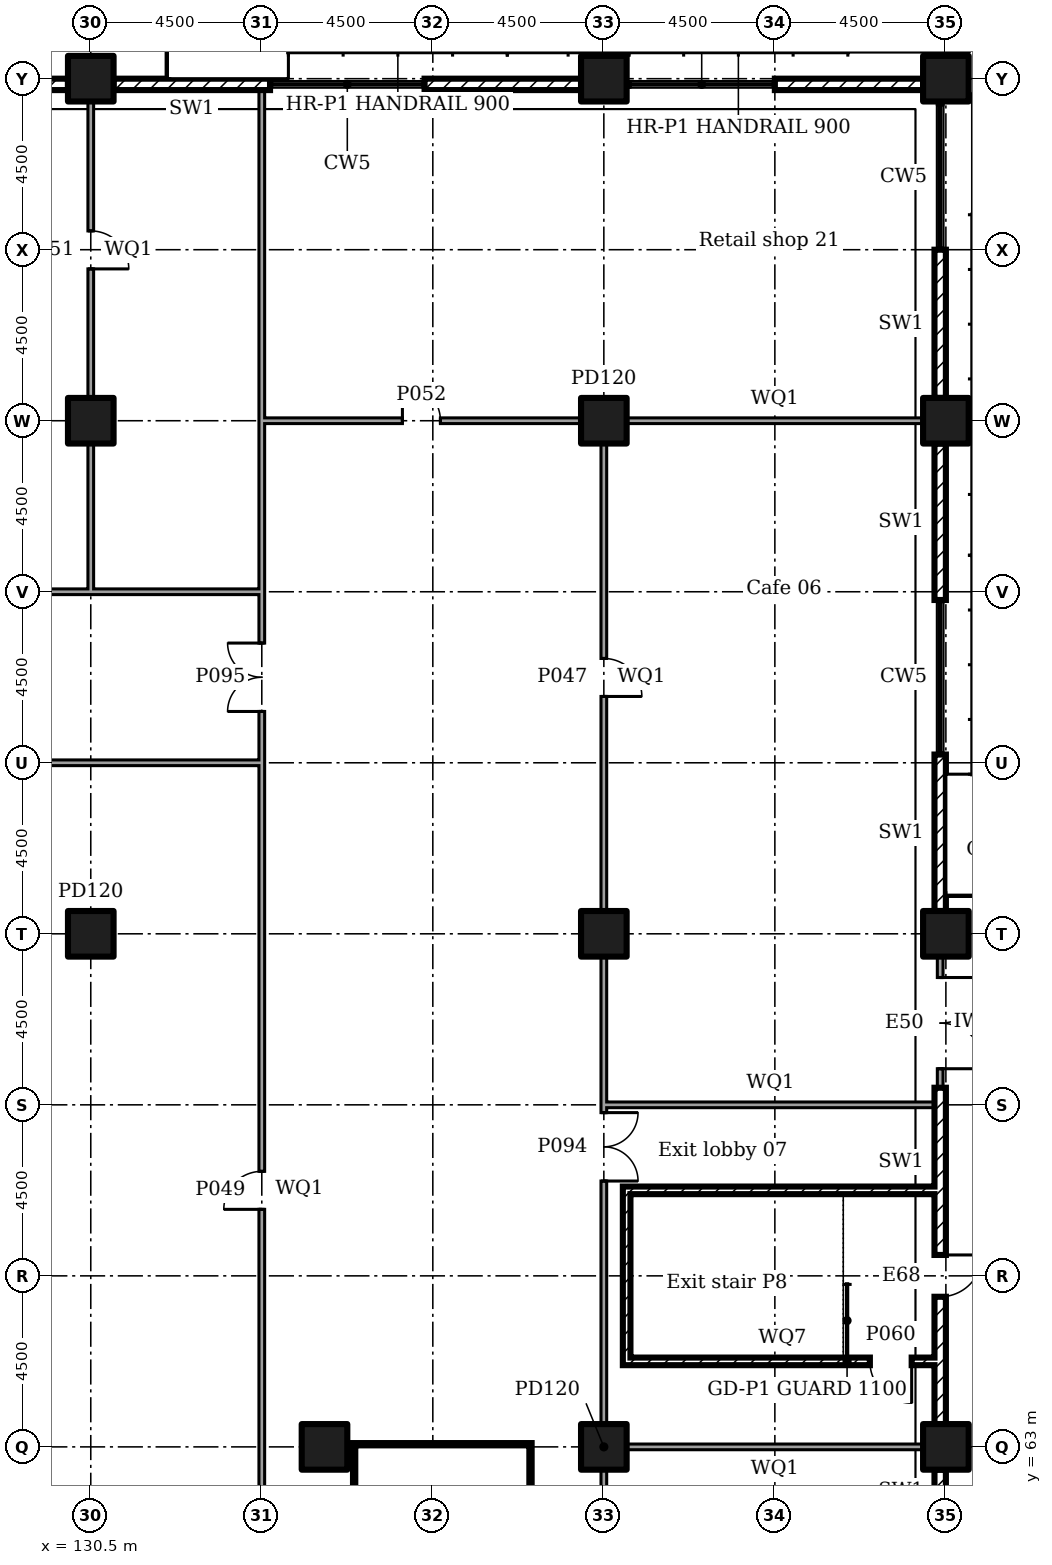
"""IFC4 building model, lengths in metres.
Left out: names, types, materials, properties, quantities, classifications, styles, units other than length and angle.
Written with IfcOpenShell. Run it as: python <this file> out.ifc"""

import sys

from ifc_helpers import new_model, si_unit, direction, frame, frame_2d, origin, origin_2d, place, context, subcontext, project, spatial, rectangle, extrude, element, fill, save


model = new_model("IFC4")
c1 = context("Model", 3, precision=1e-05, world=origin(), true_north=direction((0.0, 1.0)))
c2 = subcontext(c1, "Body", "Model", "MODEL_VIEW")
j1 = project(units=[si_unit("LENGTHUNIT", "METRE"), si_unit("PLANEANGLEUNIT", "RADIAN")], contexts=[c1])
p1 = place(None, origin())
s1 = spatial("IfcSite", under=j1, at=p1, CompositionType="ELEMENT")
p2 = place(p1, origin())
s2 = spatial("IfcBuilding", under=s1, at=p2, CompositionType="ELEMENT")
p3 = place(p2, origin())
s3 = spatial("IfcBuildingStorey", under=s2, at=p3, CompositionType="ELEMENT", Elevation=0.0)
for number, where in (
    (1, (130.5, 76.5, 0.0)),
    (2, (130.5, 90.0, 0.0)),
    (3, (130.5, 99.0, 0.0)),
    (4, (136.65, 63.0, 0.0)),
    (5, (144.0, 63.0, 0.0)),
    (6, (144.0, 76.5, 0.0)),
    (7, (144.0, 90.0, 0.0)),
    (8, (144.0, 99.0, 0.0)),
    (9, (153.0, 63.0, 0.0)),
    (10, (153.0, 76.5, 0.0)),
    (11, (153.0, 90.0, 0.0)),
    (12, (153.0, 99.0, 0.0)),
):
    element("IfcColumn", number, at=place(p3, frame(where)), inside=s3, PredefinedType="COLUMN", context=c2, shape_type="SweptSolid", body=[
        extrude(rectangle(XDim=1.2, YDim=1.2, at=origin_2d()), origin(), (0.0, 0.0, 1.0), 6.0),
    ])
p4 = place(p3, frame((152.85, 61.3, 0.0), z_axis=(0.0, 0.0, 1.0), x_axis=(0.0, 1.0, 0.0)))
e13 = element("IfcWall", 13, at=p4, inside=s3, PredefinedType="ELEMENTEDWALL", context=c2, shape_type="SweptSolid", body=[
    extrude(rectangle(XDim=1.1, YDim=0.3, at=frame_2d((0.55, 0.0))), origin(), (0.0, 0.0, 1.0), 5.55),
])
p5 = place(p3, frame((152.85, 63.6, 0.0), z_axis=(0.0, 0.0, 1.0), x_axis=(0.0, 1.0, 0.0)))
e14 = element("IfcWall", 14, at=p5, inside=s3, PredefinedType="ELEMENTEDWALL", context=c2, shape_type="SweptSolid", body=[
    extrude(rectangle(XDim=2.85, YDim=0.3, at=frame_2d((1.425, 0.0))), origin(), (0.0, 0.0, 1.0), 5.55),
])
p6 = place(p3, frame((152.85, 66.45, 0.0), z_axis=(0.0, 0.0, 1.0), x_axis=(0.0, 1.0, 0.0)))
e15 = element("IfcWall", 15, at=p6, inside=s3, PredefinedType="ELEMENTEDWALL", context=c2, shape_type="SweptSolid", body=[
    extrude(rectangle(XDim=2.1, YDim=0.3, at=frame_2d((1.05, 0.0))), origin(), (0.0, 0.0, 1.0), 5.55),
])
p7 = place(p6, frame((0.5, 0.0, 0.0)))
e16 = element("IfcOpeningElement", 16, at=p7, cuts=e15, PredefinedType="OPENING", context=c2, shape_type="SweptSolid", body=[
    extrude(rectangle(XDim=1.1, YDim=2.4, at=frame_2d((0.55, 1.2))), frame((0.0, 0.16, 0.0), z_axis=(0.0, -1.0, 0.0), x_axis=(1.0, 0.0, 0.0)), (0.0, 0.0, 1.0), 0.32),
])
p8 = place(p3, frame((152.85, 68.55, 0.0), z_axis=(0.0, 0.0, 1.0), x_axis=(0.0, 1.0, 0.0)))
e17 = element("IfcWall", 17, at=p8, inside=s3, PredefinedType="ELEMENTEDWALL", context=c2, shape_type="SweptSolid", body=[
    extrude(rectangle(XDim=3.9, YDim=0.3, at=frame_2d((1.95, 0.0))), origin(), (0.0, 0.0, 1.0), 5.55),
])
p9 = place(p3, frame((152.85, 72.45, 0.0), z_axis=(0.0, 0.0, 1.0), x_axis=(0.0, 1.0, 0.0)))
e18 = element("IfcWall", 18, at=p9, inside=s3, PredefinedType="SOLIDWALL", context=c2, shape_type="SweptSolid", body=[
    extrude(rectangle(XDim=3.45, YDim=0.15, at=frame_2d((1.725, 0.0))), origin(), (0.0, 0.0, 1.0), 5.55),
])
p10 = place(p9, frame((0.5, 0.0, 0.0)))
e19 = element("IfcOpeningElement", 19, at=p10, cuts=e18, PredefinedType="OPENING", context=c2, shape_type="SweptSolid", body=[
    extrude(rectangle(XDim=2.4, YDim=2.7, at=frame_2d((1.2, 1.35))), frame((0.0, 0.085, 0.0), z_axis=(0.0, -1.0, 0.0), x_axis=(1.0, 0.0, 0.0)), (0.0, 0.0, 1.0), 0.17),
])
for number, where, z_axis, x_axis in (
    (20, (152.85, 77.1, 0.0), (0.0, 0.0, 1.0), (0.0, 1.0, 0.0)),
    (21, (152.85, 85.283, 0.0), (0.0, 0.0, 1.0), (0.0, 1.0, 0.0)),
):
    element("IfcWall", number, at=place(p3, frame(where, z_axis=z_axis, x_axis=x_axis)), inside=s3, PredefinedType="ELEMENTEDWALL", context=c2, shape_type="SweptSolid", body=[
        extrude(rectangle(XDim=4.116, YDim=0.3, at=frame_2d((2.058, 0.0))), origin(), (0.0, 0.0, 1.0), 5.55),
    ])
for number, where, z_axis, x_axis in (
    (22, (152.85, 90.6, 0.0), (0.0, 0.0, 1.0), (0.0, 1.0, 0.0)),
    (23, (152.4, 98.85, 0.0), (0.0, 0.0, 1.0), (-1.0, 0.0, 0.0)),
):
    element("IfcWall", number, at=place(p3, frame(where, z_axis=z_axis, x_axis=x_axis)), inside=s3, PredefinedType="ELEMENTEDWALL", context=c2, shape_type="SweptSolid", body=[
        extrude(rectangle(XDim=3.9, YDim=0.3, at=frame_2d((1.95, 0.0))), origin(), (0.0, 0.0, 1.0), 5.55),
    ])
for number, where, z_axis, x_axis in (
    (24, (143.4, 98.85, 0.0), (0.0, 0.0, 1.0), (-1.0, 0.0, 0.0)),
    (25, (135.217, 98.85, 0.0), (0.0, 0.0, 1.0), (-1.0, 0.0, 0.0)),
):
    element("IfcWall", number, at=place(p3, frame(where, z_axis=z_axis, x_axis=x_axis)), inside=s3, PredefinedType="ELEMENTEDWALL", context=c2, shape_type="SweptSolid", body=[
        extrude(rectangle(XDim=4.116, YDim=0.3, at=frame_2d((2.058, 0.0))), origin(), (0.0, 0.0, 1.0), 5.55),
    ])
p11 = place(p3, frame((129.9, 98.85, 0.0), z_axis=(0.0, 0.0, 1.0), x_axis=(-1.0, 0.0, 0.0)))
e26 = element("IfcWall", 26, at=p11, inside=s3, PredefinedType="ELEMENTEDWALL", context=c2, shape_type="SweptSolid", body=[
    extrude(rectangle(XDim=1.65, YDim=0.3, at=frame_2d((0.825, 0.0))), origin(), (0.0, 0.0, 1.0), 5.55),
])
p12 = place(p3, frame((144.0, 50.095, 0.0), z_axis=(0.0, 0.0, 1.0), x_axis=(0.0, 1.0, 0.0)))
e27 = element("IfcWall", 27, at=p12, inside=s3, PredefinedType="PARTITIONING", context=c2, shape_type="SweptSolid", body=[
    extrude(rectangle(XDim=12.31, YDim=0.15, at=frame_2d((6.155, 0.0))), origin(), (0.0, 0.0, 1.0), 5.55),
])
p13 = place(p12, frame((5.65, 0.0, 0.0)))
e28 = element("IfcOpeningElement", 28, at=p13, cuts=e27, PredefinedType="OPENING", context=c2, shape_type="SweptSolid", body=[
    extrude(rectangle(XDim=1.0, YDim=2.1, at=frame_2d((0.5, 1.05))), frame((0.0, 0.085, 0.0), z_axis=(0.0, -1.0, 0.0), x_axis=(1.0, 0.0, 0.0)), (0.0, 0.0, 1.0), 0.17),
])
p14 = place(p3, frame((144.0, 63.595, 0.0), z_axis=(0.0, 0.0, 1.0), x_axis=(0.0, 1.0, 0.0)))
e29 = element("IfcWall", 29, at=p14, inside=s3, PredefinedType="PARTITIONING", context=c2, shape_type="SweptSolid", body=[
    extrude(rectangle(XDim=8.48, YDim=0.15, at=frame_2d((4.24, 0.0))), origin(), (0.0, 0.0, 1.0), 5.55),
])
p15 = place(p14, frame((6.4, 0.0, 0.0)))
e30 = element("IfcOpeningElement", 30, at=p15, cuts=e29, PredefinedType="OPENING", context=c2, shape_type="SweptSolid", body=[
    extrude(rectangle(XDim=1.8, YDim=2.1, at=frame_2d((0.9, 1.05))), frame((0.0, 0.085, 0.0), z_axis=(0.0, -1.0, 0.0), x_axis=(1.0, 0.0, 0.0)), (0.0, 0.0, 1.0), 0.17),
])
p16 = place(p3, frame((144.0, 72.0, 0.0), z_axis=(0.0, 0.0, 1.0), x_axis=(0.0, 1.0, 0.0)))
e31 = element("IfcWall", 31, at=p16, inside=s3, PredefinedType="PARTITIONING", context=c2, shape_type="SweptSolid", body=[
    extrude(rectangle(XDim=3.905, YDim=0.15, at=frame_2d((1.953, 0.0))), origin(), (0.0, 0.0, 1.0), 5.55),
])
p17 = place(p3, frame((144.0, 77.095, 0.0), z_axis=(0.0, 0.0, 1.0), x_axis=(0.0, 1.0, 0.0)))
e32 = element("IfcWall", 32, at=p17, inside=s3, PredefinedType="PARTITIONING", context=c2, shape_type="SweptSolid", body=[
    extrude(rectangle(XDim=12.31, YDim=0.15, at=frame_2d((6.155, 0.0))), origin(), (0.0, 0.0, 1.0), 5.55),
])
p18 = place(p17, frame((5.65, 0.0, 0.0)))
e33 = element("IfcOpeningElement", 33, at=p18, cuts=e32, PredefinedType="OPENING", context=c2, shape_type="SweptSolid", body=[
    extrude(rectangle(XDim=1.0, YDim=2.1, at=frame_2d((0.5, 1.05))), frame((0.0, 0.085, 0.0), z_axis=(0.0, -1.0, 0.0), x_axis=(1.0, 0.0, 0.0)), (0.0, 0.0, 1.0), 0.17),
])
p19 = place(p3, frame((135.0, 58.5, 0.0), z_axis=(0.0, 0.0, 1.0), x_axis=(0.0, 1.0, 0.0)))
e34 = element("IfcWall", 34, at=p19, inside=s3, PredefinedType="PARTITIONING", context=c2, shape_type="SweptSolid", body=[
    extrude(rectangle(XDim=22.575, YDim=0.15, at=frame_2d((11.288, 0.0))), origin(), (0.0, 0.0, 1.0), 5.55),
])
p20 = place(p19, frame((10.75, 0.0, 0.0)))
e35 = element("IfcOpeningElement", 35, at=p20, cuts=e34, PredefinedType="OPENING", context=c2, shape_type="SweptSolid", body=[
    extrude(rectangle(XDim=1.0, YDim=2.1, at=frame_2d((0.5, 1.05))), frame((0.0, 0.085, 0.0), z_axis=(0.0, -1.0, 0.0), x_axis=(1.0, 0.0, 0.0)), (0.0, 0.0, 1.0), 0.17),
])
p21 = place(p3, frame((135.0, 81.0, 0.0), z_axis=(0.0, 0.0, 1.0), x_axis=(0.0, 1.0, 0.0)))
e36 = element("IfcWall", 36, at=p21, inside=s3, PredefinedType="PARTITIONING", context=c2, shape_type="SweptSolid", body=[
    extrude(rectangle(XDim=4.575, YDim=0.15, at=frame_2d((2.288, 0.0))), origin(), (0.0, 0.0, 1.0), 5.55),
])
p22 = place(p21, frame((1.35, 0.0, 0.0)))
e37 = element("IfcOpeningElement", 37, at=p22, cuts=e36, PredefinedType="OPENING", context=c2, shape_type="SweptSolid", body=[
    extrude(rectangle(XDim=1.8, YDim=2.1, at=frame_2d((0.9, 1.05))), frame((0.0, 0.085, 0.0), z_axis=(0.0, -1.0, 0.0), x_axis=(1.0, 0.0, 0.0)), (0.0, 0.0, 1.0), 0.17),
])
p23 = place(p3, frame((135.0, 85.5, 0.0), z_axis=(0.0, 0.0, 1.0), x_axis=(0.0, 1.0, 0.0)))
e38 = element("IfcWall", 38, at=p23, inside=s3, PredefinedType="PARTITIONING", context=c2, shape_type="SweptSolid", body=[
    extrude(rectangle(XDim=4.575, YDim=0.15, at=frame_2d((2.288, 0.0))), origin(), (0.0, 0.0, 1.0), 5.55),
])
p24 = place(p3, frame((135.075, 90.0, 0.0)))
e39 = element("IfcWall", 39, at=p24, inside=s3, PredefinedType="PARTITIONING", context=c2, shape_type="SweptSolid", body=[
    extrude(rectangle(XDim=8.33, YDim=0.15, at=frame_2d((4.165, 0.0))), origin(), (0.0, 0.0, 1.0), 5.55),
])
p25 = place(p24, frame((3.625, 0.0, 0.0)))
e40 = element("IfcOpeningElement", 40, at=p25, cuts=e39, PredefinedType="OPENING", context=c2, shape_type="SweptSolid", body=[
    extrude(rectangle(XDim=1.0, YDim=2.1, at=frame_2d((0.5, 1.05))), frame((0.0, 0.085, 0.0), z_axis=(0.0, -1.0, 0.0), x_axis=(1.0, 0.0, 0.0)), (0.0, 0.0, 1.0), 0.17),
])
p26 = place(p3, frame((137.5, 53.9, 0.0), z_axis=(0.0, 0.0, 1.0), x_axis=(0.0, 1.0, 0.0)))
e41 = element("IfcWall", 41, at=p26, inside=s3, PredefinedType="SOLIDWALL", context=c2, shape_type="SweptSolid", body=[
    extrude(rectangle(XDim=9.2, YDim=0.2, at=frame_2d((4.6, 0.0))), origin(), (0.0, 0.0, 1.0), 5.55),
])
p27 = place(p26, frame((0.6, 0.0, 0.0)))
e42 = element("IfcOpeningElement", 42, at=p27, cuts=e41, PredefinedType="OPENING", context=c2, shape_type="SweptSolid", body=[
    extrude(rectangle(XDim=1.1, YDim=2.1, at=frame_2d((0.55, 1.05))), frame((0.0, 0.11, 0.0), z_axis=(0.0, -1.0, 0.0), x_axis=(1.0, 0.0, 0.0)), (0.0, 0.0, 1.0), 0.22),
])
p28 = place(p3, frame((142.0, 53.9, 0.0), z_axis=(0.0, 0.0, 1.0), x_axis=(0.0, 1.0, 0.0)))
e43 = element("IfcWall", 43, at=p28, inside=s3, PredefinedType="SOLIDWALL", context=c2, shape_type="SweptSolid", body=[
    extrude(rectangle(XDim=9.2, YDim=0.2, at=frame_2d((4.6, 0.0))), origin(), (0.0, 0.0, 1.0), 5.55),
])
p29 = place(p3, frame((137.6, 63.0, 0.0)))
e44 = element("IfcWall", 44, at=p29, inside=s3, PredefinedType="SOLIDWALL", context=c2, shape_type="SweptSolid", body=[
    extrude(rectangle(XDim=4.3, YDim=0.2, at=frame_2d((2.15, 0.0))), origin(), (0.0, 0.0, 1.0), 5.55),
])
p30 = place(p3, frame((144.595, 63.0, 0.0)))
e45 = element("IfcWall", 45, at=p30, inside=s3, PredefinedType="PARTITIONING", context=c2, shape_type="SweptSolid", body=[
    extrude(rectangle(XDim=7.81, YDim=0.15, at=frame_2d((3.905, 0.0))), origin(), (0.0, 0.0, 1.0), 5.55),
])
p31 = place(p3, frame((144.075, 72.0, 0.0)))
e46 = element("IfcWall", 46, at=p31, inside=s3, PredefinedType="PARTITIONING", context=c2, shape_type="SweptSolid", body=[
    extrude(rectangle(XDim=8.625, YDim=0.15, at=frame_2d((4.312, 0.0))), origin(), (0.0, 0.0, 1.0), 5.55),
])
p32 = place(p3, frame((144.6, 65.15, 0.0), z_axis=(0.0, 0.0, 1.0), x_axis=(0.0, 1.0, 0.0)))
e47 = element("IfcWall", 47, at=p32, inside=s3, PredefinedType="SOLIDWALL", context=c2, shape_type="SweptSolid", body=[
    extrude(rectangle(XDim=4.7, YDim=0.2, at=frame_2d((2.35, 0.0))), origin(), (0.0, 0.0, 1.0), 5.55),
])
p33 = place(p3, frame((144.7, 65.25, 0.0)))
e48 = element("IfcWall", 48, at=p33, inside=s3, PredefinedType="SOLIDWALL", context=c2, shape_type="SweptSolid", body=[
    extrude(rectangle(XDim=8.0, YDim=0.2, at=frame_2d((4.0, 0.0))), origin(), (0.0, 0.0, 1.0), 5.55),
])
p34 = place(p33, frame((6.3, 0.0, 0.0)))
e49 = element("IfcOpeningElement", 49, at=p34, cuts=e48, PredefinedType="OPENING", context=c2, shape_type="SweptSolid", body=[
    extrude(rectangle(XDim=1.1, YDim=2.1, at=frame_2d((0.55, 1.05))), frame((0.0, 0.11, 0.0), z_axis=(0.0, -1.0, 0.0), x_axis=(1.0, 0.0, 0.0)), (0.0, 0.0, 1.0), 0.22),
])
p35 = place(p3, frame((144.7, 69.75, 0.0)))
e50 = element("IfcWall", 50, at=p35, inside=s3, PredefinedType="SOLIDWALL", context=c2, shape_type="SweptSolid", body=[
    extrude(rectangle(XDim=8.0, YDim=0.2, at=frame_2d((4.0, 0.0))), origin(), (0.0, 0.0, 1.0), 5.55),
])
p36 = place(p3, frame((144.595, 90.0, 0.0)))
e51 = element("IfcWall", 51, at=p36, inside=s3, PredefinedType="PARTITIONING", context=c2, shape_type="SweptSolid", body=[
    extrude(rectangle(XDim=7.81, YDim=0.15, at=frame_2d((3.905, 0.0))), origin(), (0.0, 0.0, 1.0), 5.55),
])
p37 = place(p3, frame((112.425, 81.0, 0.0)))
e52 = element("IfcWall", 52, at=p37, inside=s3, PredefinedType="PARTITIONING", context=c2, shape_type="SweptSolid", body=[
    extrude(rectangle(XDim=22.5, YDim=0.15, at=frame_2d((11.25, 0.0))), origin(), (0.0, 0.0, 1.0), 5.55),
])
p38 = place(p3, frame((112.575, 85.5, 0.0)))
e53 = element("IfcWall", 53, at=p38, inside=s3, PredefinedType="PARTITIONING", context=c2, shape_type="SweptSolid", body=[
    extrude(rectangle(XDim=18.0, YDim=0.15, at=frame_2d((9.0, 0.0))), origin(), (0.0, 0.0, 1.0), 5.55),
])
p39 = place(p38, frame((8.025, 0.0, 0.0)))
e54 = element("IfcOpeningElement", 54, at=p39, cuts=e53, PredefinedType="OPENING", context=c2, shape_type="SweptSolid", body=[
    extrude(rectangle(XDim=1.8, YDim=2.1, at=frame_2d((0.9, 1.05))), frame((0.0, 0.085, 0.0), z_axis=(0.0, -1.0, 0.0), x_axis=(1.0, 0.0, 0.0)), (0.0, 0.0, 1.0), 0.17),
])
p40 = place(p3, frame((130.5, 85.5, 0.0)))
e55 = element("IfcWall", 55, at=p40, inside=s3, PredefinedType="PARTITIONING", context=c2, shape_type="SweptSolid", body=[
    extrude(rectangle(XDim=4.425, YDim=0.15, at=frame_2d((2.212, 0.0))), origin(), (0.0, 0.0, 1.0), 5.55),
])
p41 = place(p3, frame((130.5, 85.575, 0.0), z_axis=(0.0, 0.0, 1.0), x_axis=(0.0, 1.0, 0.0)))
e56 = element("IfcWall", 56, at=p41, inside=s3, PredefinedType="PARTITIONING", context=c2, shape_type="SweptSolid", body=[
    extrude(rectangle(XDim=3.83, YDim=0.15, at=frame_2d((1.915, 0.0))), origin(), (0.0, 0.0, 1.0), 5.55),
])
p42 = place(p3, frame((130.5, 90.595, 0.0), z_axis=(0.0, 0.0, 1.0), x_axis=(0.0, 1.0, 0.0)))
e57 = element("IfcWall", 57, at=p42, inside=s3, PredefinedType="PARTITIONING", context=c2, shape_type="SweptSolid", body=[
    extrude(rectangle(XDim=7.81, YDim=0.15, at=frame_2d((3.905, 0.0))), origin(), (0.0, 0.0, 1.0), 5.55),
])
p43 = place(p42, frame((3.4, 0.0, 0.0)))
e58 = element("IfcOpeningElement", 58, at=p43, cuts=e57, PredefinedType="OPENING", context=c2, shape_type="SweptSolid", body=[
    extrude(rectangle(XDim=1.0, YDim=2.1, at=frame_2d((0.5, 1.05))), frame((0.0, 0.085, 0.0), z_axis=(0.0, -1.0, 0.0), x_axis=(1.0, 0.0, 0.0)), (0.0, 0.0, 1.0), 0.17),
])
p44 = place(p3, frame((135.0, 90.0, 0.0), z_axis=(0.0, 0.0, 1.0), x_axis=(0.0, 1.0, 0.0)))
e59 = element("IfcWall", 59, at=p44, inside=s3, PredefinedType="PARTITIONING", context=c2, shape_type="SweptSolid", body=[
    extrude(rectangle(XDim=8.7, YDim=0.15, at=frame_2d((4.35, 0.0))), origin(), (0.0, 0.0, 1.0), 5.55),
])
p45 = place(p3, frame((137.6, 62.3, 0.0)))
e60 = element("IfcWall", 60, at=p45, inside=s3, PredefinedType="SOLIDWALL", context=c2, shape_type="SweptSolid", body=[
    extrude(rectangle(XDim=4.3, YDim=0.2, at=frame_2d((2.15, 0.0))), origin(), (0.0, 0.0, 1.0), 2.8),
])
p46 = place(p7, frame((1.1, 0.0, 0.0), x_axis=(-1.0, 0.0, 0.0)))
e61 = element("IfcDoor", 61, at=p46, inside=s3, OperationType="SINGLE_SWING_RIGHT", PredefinedType="NOTDEFINED", context=c2, shape_type="SweptSolid", body=[
    extrude(rectangle(XDim=1.1, YDim=2.4, at=frame_2d((0.55, 1.2))), frame((0.0, 0.025, 0.0), z_axis=(0.0, -1.0, 0.0), x_axis=(1.0, 0.0, 0.0)), (0.0, 0.0, 1.0), 0.05),
])
fill(e16, e61)
p47 = place(p10, frame((2.4, 0.0, 0.0), x_axis=(-1.0, 0.0, 0.0)))
e62 = element("IfcDoor", 62, at=p47, inside=s3, OperationType="DOUBLE_DOOR_DOUBLE_SWING", PredefinedType="NOTDEFINED", context=c2, shape_type="SweptSolid", body=[
    extrude(rectangle(XDim=2.4, YDim=2.7, at=frame_2d((1.2, 1.35))), frame((0.0, 0.025, 0.0), z_axis=(0.0, -1.0, 0.0), x_axis=(1.0, 0.0, 0.0)), (0.0, 0.0, 1.0), 0.05),
])
fill(e19, e62)
p48 = place(p18, frame((1.0, 0.0, 0.0), x_axis=(-1.0, 0.0, 0.0)))
e63 = element("IfcDoor", 63, at=p48, inside=s3, OperationType="SINGLE_SWING_LEFT", PredefinedType="DOOR", context=c2, shape_type="SweptSolid", body=[
    extrude(rectangle(XDim=1.0, YDim=2.1, at=frame_2d((0.5, 1.05))), frame((0.0, 0.025, 0.0), z_axis=(0.0, -1.0, 0.0), x_axis=(1.0, 0.0, 0.0)), (0.0, 0.0, 1.0), 0.05),
])
fill(e33, e63)
p49 = place(p20, origin())
e64 = element("IfcDoor", 64, at=p49, inside=s3, OperationType="SINGLE_SWING_RIGHT", PredefinedType="DOOR", context=c2, shape_type="SweptSolid", body=[
    extrude(rectangle(XDim=1.0, YDim=2.1, at=frame_2d((0.5, 1.05))), frame((0.0, 0.025, 0.0), z_axis=(0.0, -1.0, 0.0), x_axis=(1.0, 0.0, 0.0)), (0.0, 0.0, 1.0), 0.05),
])
fill(e35, e64)
p50 = place(p43, frame((1.0, 0.0, 0.0), x_axis=(-1.0, 0.0, 0.0)))
e65 = element("IfcDoor", 65, at=p50, inside=s3, OperationType="SINGLE_SWING_LEFT", PredefinedType="DOOR", context=c2, shape_type="SweptSolid", body=[
    extrude(rectangle(XDim=1.0, YDim=2.1, at=frame_2d((0.5, 1.05))), frame((0.0, 0.025, 0.0), z_axis=(0.0, -1.0, 0.0), x_axis=(1.0, 0.0, 0.0)), (0.0, 0.0, 1.0), 0.05),
])
fill(e58, e65)
p51 = place(p25, origin())
e66 = element("IfcDoor", 66, at=p51, inside=s3, OperationType="SINGLE_SWING_RIGHT", PredefinedType="DOOR", context=c2, shape_type="SweptSolid", body=[
    extrude(rectangle(XDim=1.0, YDim=2.1, at=frame_2d((0.5, 1.05))), frame((0.0, 0.025, 0.0), z_axis=(0.0, -1.0, 0.0), x_axis=(1.0, 0.0, 0.0)), (0.0, 0.0, 1.0), 0.05),
])
fill(e40, e66)
p52 = place(p34, frame((1.1, 0.0, 0.0), x_axis=(-1.0, 0.0, 0.0)))
e67 = element("IfcDoor", 67, at=p52, inside=s3, OperationType="SINGLE_SWING_RIGHT", PredefinedType="DOOR", context=c2, shape_type="SweptSolid", body=[
    extrude(rectangle(XDim=1.1, YDim=2.1, at=frame_2d((0.55, 1.05))), frame((0.0, 0.025, 0.0), z_axis=(0.0, -1.0, 0.0), x_axis=(1.0, 0.0, 0.0)), (0.0, 0.0, 1.0), 0.05),
])
fill(e49, e67)
p53 = place(p15, frame((1.8, 0.0, 0.0), x_axis=(-1.0, 0.0, 0.0)))
e68 = element("IfcDoor", 68, at=p53, inside=s3, OperationType="DOUBLE_DOOR_SINGLE_SWING", PredefinedType="DOOR", context=c2, shape_type="SweptSolid", body=[
    extrude(rectangle(XDim=1.8, YDim=2.1, at=frame_2d((0.9, 1.05))), frame((0.0, 0.025, 0.0), z_axis=(0.0, -1.0, 0.0), x_axis=(1.0, 0.0, 0.0)), (0.0, 0.0, 1.0), 0.05),
])
fill(e30, e68)
p54 = place(p22, origin())
e69 = element("IfcDoor", 69, at=p54, inside=s3, OperationType="DOUBLE_DOOR_SINGLE_SWING", PredefinedType="DOOR", context=c2, shape_type="SweptSolid", body=[
    extrude(rectangle(XDim=1.8, YDim=2.1, at=frame_2d((0.9, 1.05))), frame((0.0, 0.025, 0.0), z_axis=(0.0, -1.0, 0.0), x_axis=(1.0, 0.0, 0.0)), (0.0, 0.0, 1.0), 0.05),
])
fill(e37, e69)
save(model, sys.argv[1])
